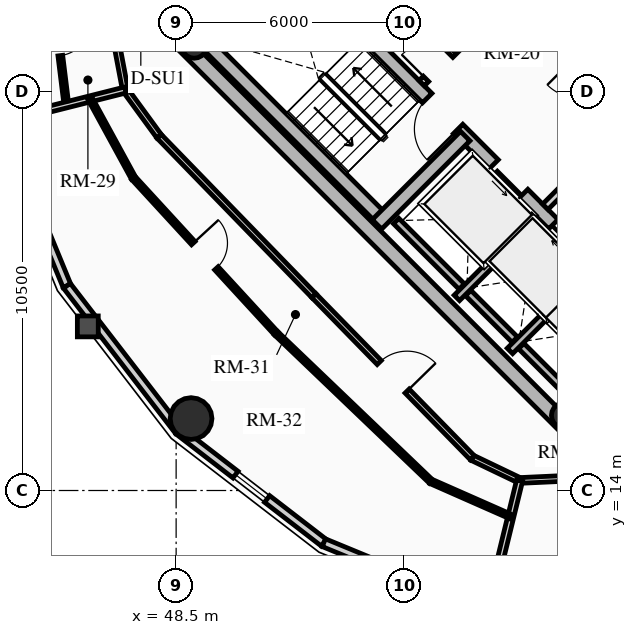
"""IFC4 building model, lengths in metres.
Left out: names, types, materials, properties, quantities, classifications, styles, units other than length and angle.
Written with IfcOpenShell. Run it as: python <this file> out.ifc"""

import sys

from ifc_helpers import new_model, si_unit, direction, frame, frame_2d, origin, origin_2d, place, context, subcontext, project, spatial, rectangle, circle, hollow_circle, extrude, source, transform, mapped, element, fill, save


model = new_model("IFC4")
c1 = context("Model", 3, precision=1e-05, world=origin(), true_north=direction((0.0, 1.0)))
c2 = subcontext(c1, "Body", "Model", "MODEL_VIEW")
j1 = project(units=[si_unit("LENGTHUNIT", "METRE"), si_unit("PLANEANGLEUNIT", "RADIAN")], contexts=[c1])
p1 = place(None, origin())
s1 = spatial("IfcSite", under=j1, at=p1, CompositionType="ELEMENT")
p2 = place(p1, origin())
s2 = spatial("IfcBuilding", under=s1, at=p2, CompositionType="ELEMENT")
p3 = place(p2, frame((0.0, 0.0, 217.03)))
s3 = spatial("IfcBuildingStorey", under=s2, at=p3, CompositionType="ELEMENT", Elevation=217.03)
for number, where, z_axis, x_axis in (
    (1, (58.702, 15.732, 0.0), (0.0, 0.0, 1.0), (-0.707, 0.707, 0.0)),
    (2, (66.268, 23.298, 0.0), (0.0, 0.0, 1.0), (-0.707, 0.707, 0.0)),
):
    element("IfcWall", number, at=place(p3, frame(where, z_axis=z_axis, x_axis=x_axis)), inside=s3, PredefinedType="SHEAR", context=c2, shape_type="SweptSolid", body=[
        extrude(rectangle(XDim=14.1, YDim=0.4, at=frame_2d((7.05, 0.0))), origin(), (0.0, 0.0, 1.0), 2.91),
    ])
p4 = place(p3, frame((58.561, 15.873, 0.0), z_axis=(0.0, 0.0, 1.0), x_axis=(0.707106781187, 0.707106781187, 0.0)))
e3 = element("IfcWall", 3, at=p4, inside=s3, PredefinedType="SHEAR", context=c2, shape_type="SweptSolid", body=[
    extrude(rectangle(XDim=10.7, YDim=0.4, at=frame_2d((5.35, 0.0))), origin(), (0.0, 0.0, 1.0), 2.91),
])
m1 = source(origin(), c2, "Body", "SweptSolid", [
    extrude(rectangle(XDim=1.5, YDim=2.02, at=frame_2d((0.75, 1.01))), frame((0.0, 0.21, 0.0), z_axis=(0.0, -1.0, 0.0), x_axis=(1.0, 0.0, 0.0)), (0.0, 0.0, 1.0), 0.42),
])
p5 = place(p4, frame((5.45, 0.0, 0.0)))
e4 = element("IfcOpeningElement", 4, at=p5, cuts=e3, PredefinedType="OPENING", context=c2, shape_type="MappedRepresentation", body=[
    mapped(m1, transform((0.0, 0.0, 0.0), x_axis=(1.0, 0.0, 0.0), y_axis=(0.0, 1.0, 0.0), z_axis=(0.0, 0.0, 1.0), scale=1.0)),
])
p6 = place(p3, frame((48.873, 25.561, 0.0), z_axis=(0.0, 0.0, 1.0), x_axis=(0.707106781187, 0.707106781187, 0.0)))
e5 = element("IfcWall", 5, at=p6, inside=s3, PredefinedType="SHEAR", context=c2, shape_type="SweptSolid", body=[
    extrude(rectangle(XDim=10.7, YDim=0.4, at=frame_2d((5.35, 0.0))), origin(), (0.0, 0.0, 1.0), 2.91),
])
p7 = place(p6, frame((4.6, 0.0, 0.0)))
e6 = element("IfcOpeningElement", 6, at=p7, cuts=e5, PredefinedType="OPENING", context=c2, shape_type="MappedRepresentation", body=[
    mapped(m1, transform((0.0, 0.0, 0.0), x_axis=(1.0, 0.0, 0.0), y_axis=(0.0, 1.0, 0.0), z_axis=(0.0, 0.0, 1.0), scale=1.0)),
])
p8 = place(p3, frame((61.06, 18.373, 0.0), z_axis=(0.0, 0.0, 1.0), x_axis=(-0.707106781187, 0.707106781187, 0.0)))
e7 = element("IfcWall", 7, at=p8, inside=s3, PredefinedType="SHEAR", context=c2, shape_type="SweptSolid", body=[
    extrude(rectangle(XDim=13.7, YDim=0.35, at=frame_2d((6.85, 0.0))), origin(), (0.0, 0.0, 1.0), 2.91),
])
m2 = source(origin(), c2, "Body", "SweptSolid", [
    extrude(rectangle(XDim=1.1, YDim=2.015, at=frame_2d((0.55, 1.007))), frame((0.0, 0.185, 0.0), z_axis=(0.0, -1.0, 0.0), x_axis=(1.0, 0.0, 0.0)), (0.0, 0.0, 1.0), 0.37),
])
p9 = place(p8, frame((4.85, 0.0, 0.0)))
e8 = element("IfcOpeningElement", 8, at=p9, cuts=e7, PredefinedType="OPENING", context=c2, shape_type="MappedRepresentation", body=[
    mapped(m2, transform((0.0, 0.0, 0.0), x_axis=(1.0, 0.0, 0.0), y_axis=(0.0, 1.0, 0.0), z_axis=(0.0, 0.0, 1.0), scale=1.0)),
])
p10 = place(p8, frame((0.625, 0.0, 0.0)))
e9 = element("IfcOpeningElement", 9, at=p10, cuts=e7, PredefinedType="OPENING", context=c2, shape_type="MappedRepresentation", body=[
    mapped(m2, transform((0.0, 0.0, 0.0), x_axis=(1.0, 0.0, 0.0), y_axis=(0.0, 1.0, 0.0), z_axis=(0.0, 0.0, 1.0), scale=1.0)),
])
p11 = place(p8, frame((2.625, 0.0, 0.0)))
e10 = element("IfcOpeningElement", 10, at=p11, cuts=e7, PredefinedType="OPENING", context=c2, shape_type="MappedRepresentation", body=[
    mapped(m2, transform((0.0, 0.0, 0.0), x_axis=(1.0, 0.0, 0.0), y_axis=(0.0, 1.0, 0.0), z_axis=(0.0, 0.0, 1.0), scale=1.0)),
])
m3 = source(origin(), c2, "Body", "SweptSolid", [
    extrude(rectangle(XDim=1.15, YDim=2.02, at=frame_2d((0.575, 1.01))), frame((0.0, 0.185, 0.0), z_axis=(0.0, -1.0, 0.0), x_axis=(1.0, 0.0, 0.0)), (0.0, 0.0, 1.0), 0.37),
])
p12 = place(p8, frame((7.27, 0.0, 0.0)))
e11 = element("IfcOpeningElement", 11, at=p12, cuts=e7, PredefinedType="OPENING", context=c2, shape_type="MappedRepresentation", body=[
    mapped(m3, transform((0.0, 0.0, 0.0), x_axis=(1.0, 0.0, 0.0), y_axis=(0.0, 1.0, 0.0), z_axis=(0.0, 0.0, 1.0), scale=1.0)),
])
p13 = place(p3, frame((63.627, 20.94, 0.0), z_axis=(0.0, 0.0, 1.0), x_axis=(-0.707119496762, 0.707094065383, 0.0)))
e12 = element("IfcWall", 12, at=p13, inside=s3, PredefinedType="SHEAR", context=c2, shape_type="SweptSolid", body=[
    extrude(rectangle(XDim=9.6, YDim=0.35, at=frame_2d((4.8, 0.0))), origin(), (0.0, 0.0, 1.0), 2.91),
])
p14 = place(p13, frame((5.28, 0.0, 0.0)))
e13 = element("IfcOpeningElement", 13, at=p14, cuts=e12, PredefinedType="OPENING", context=c2, shape_type="MappedRepresentation", body=[
    mapped(m3, transform((0.0, 0.0, 0.0), x_axis=(1.0, 0.0, 0.0), y_axis=(0.0, 1.0, 0.0), z_axis=(0.0, 0.0, 1.0), scale=1.0)),
])
p15 = place(p3, frame((53.922, 21.141, 0.0), z_axis=(0.0, 0.0, 1.0), x_axis=(-0.707106781187, 0.707106781187, 0.0)))
e14 = element("IfcWall", 14, at=p15, inside=s3, PredefinedType="SHEAR", context=c2, shape_type="SweptSolid", body=[
    extrude(rectangle(XDim=6.695, YDim=0.35, at=frame_2d((3.348, 0.0))), origin(), (0.0, 0.0, 1.0), 2.91),
])
p16 = place(p3, frame((53.784, 21.003, 0.0), z_axis=(0.0, 0.0, 1.0), x_axis=(0.707106781187, 0.707106781187, 0.0)))
e15 = element("IfcWall", 15, at=p16, inside=s3, PredefinedType="SHEAR", context=c2, shape_type="SweptSolid", body=[
    extrude(rectangle(XDim=3.285, YDim=0.35, at=frame_2d((1.643, 0.0))), origin(), (0.0, 0.0, 1.0), 2.91),
])
for number, where, z_axis, x_axis in (
    (16, (58.706, 15.976, 0.0), (0.0, 0.0, 1.0), (0.707, 0.707, 0.0)),
    (17, (48.976, 25.706, 0.0), (0.0, 0.0, 1.0), (0.707, 0.707, 0.0)),
):
    element("IfcColumn", number, at=place(p3, frame(where, z_axis=z_axis, x_axis=x_axis)), inside=s3, PredefinedType="COLUMN", context=c2, shape_type="SweptSolid", body=[
        extrude(hollow_circle(Radius=0.33, WallThickness=0.025, at=origin_2d()), origin(), (0.0, 0.0, 1.0), 2.91),
    ])
p17 = place(p3, frame((48.893, 15.893, 0.0), z_axis=(0.0, 0.0, 1.0), x_axis=(1.0, 0.0, 0.0)))
e18 = element("IfcColumn", 18, at=p17, inside=s3, PredefinedType="USERDEFINED", context=c2, shape_type="SweptSolid", body=[
    extrude(circle(Radius=0.55, at=origin_2d()), origin(), (0.0, 0.0, 1.0), 2.91),
])
p18 = place(p3, frame((45.626, 19.387, 0.0), z_axis=(0.0, 0.0, 1.0), x_axis=(-0.381309704956, 0.924447353237, 0.0)))
e19 = element("IfcWall", 19, at=p18, inside=s3, PredefinedType="SOLIDWALL", context=c2, shape_type="SweptSolid", body=[
    extrude(rectangle(XDim=4.671, YDim=0.22, at=frame_2d((2.335, 0.0))), origin(), (0.0, 0.0, 1.0), 2.322),
])
m4 = source(origin(), c2, "Body", "SweptSolid", [
    extrude(rectangle(XDim=1.05, YDim=1.3, at=frame_2d((0.525, 0.65))), frame((0.0, 0.12, 0.0), z_axis=(0.0, -1.0, 0.0), x_axis=(1.0, 0.0, 0.0)), (0.0, 0.0, 1.0), 0.24),
])
p19 = place(p18, frame((1.81, 0.0, 0.65)))
e20 = element("IfcOpeningElement", 20, at=p19, cuts=e19, PredefinedType="OPENING", context=c2, shape_type="MappedRepresentation", body=[
    mapped(m4, transform((0.0, 0.0, 0.0), x_axis=(1.0, 0.0, 0.0), y_axis=(0.0, 1.0, 0.0), z_axis=(0.0, 0.0, 1.0), scale=1.0)),
])
p20 = place(p3, frame((48.569, 15.569, 0.0), z_axis=(0.0, 0.0, 1.0), x_axis=(-0.610523083886, 0.791998462147, 0.0)))
e21 = element("IfcWall", 21, at=p20, inside=s3, PredefinedType="SOLIDWALL", context=c2, shape_type="SweptSolid", body=[
    extrude(rectangle(XDim=4.82, YDim=0.22, at=frame_2d((2.41, 0.0))), origin(), (0.0, 0.0, 1.0), 2.322),
])
p21 = place(p3, frame((52.387, 12.626, 0.0), z_axis=(0.0, 0.0, 1.0), x_axis=(-0.791998462147, 0.610523083886, 0.0)))
e22 = element("IfcWall", 22, at=p21, inside=s3, PredefinedType="SOLIDWALL", context=c2, shape_type="SweptSolid", body=[
    extrude(rectangle(XDim=4.82, YDim=0.22, at=frame_2d((2.41, 0.0))), origin(), (0.0, 0.0, 1.0), 2.322),
])
p22 = place(p21, frame((1.885, 0.0, 0.65)))
e23 = element("IfcOpeningElement", 23, at=p22, cuts=e22, PredefinedType="OPENING", context=c2, shape_type="MappedRepresentation", body=[
    mapped(m4, transform((0.0, 0.0, 0.0), x_axis=(1.0, 0.0, 0.0), y_axis=(0.0, 1.0, 0.0), z_axis=(0.0, 0.0, 1.0), scale=1.0)),
])
p23 = place(p3, frame((56.705, 10.845, 0.0), z_axis=(0.0, 0.0, 1.0), x_axis=(-0.924447353237, 0.381309704956, 0.0)))
e24 = element("IfcWall", 24, at=p23, inside=s3, PredefinedType="SOLIDWALL", context=c2, shape_type="SweptSolid", body=[
    extrude(rectangle(XDim=4.671, YDim=0.22, at=frame_2d((2.335, 0.0))), origin(), (0.0, 0.0, 1.0), 2.322),
])
p24 = place(p3, frame((55.888, 19.069, 0.0), z_axis=(0.0, 0.0, 1.0), x_axis=(0.707106781187, 0.707106781187, 0.0)))
e25 = element("IfcWall", 25, at=p24, inside=s3, PredefinedType="SHEAR", context=c2, shape_type="SweptSolid", body=[
    extrude(rectangle(XDim=2.97, YDim=0.2, at=frame_2d((1.485, 0.0))), origin(), (0.0, 0.0, 1.0), 2.91),
])
p25 = place(p3, frame((56.015, 19.366, 0.0), z_axis=(0.0, 0.0, 1.0), x_axis=(-0.707106781187, 0.707106781187, 0.0)))
e26 = element("IfcWall", 26, at=p25, inside=s3, PredefinedType="SHEAR", context=c2, shape_type="SweptSolid", body=[
    extrude(rectangle(XDim=2.44, YDim=0.2, at=frame_2d((1.22, 0.0))), origin(), (0.0, 0.0, 1.0), 2.91),
])
p26 = place(p3, frame((57.284, 17.673, 0.0), z_axis=(0.0, 0.0, 1.0), x_axis=(0.707147878904, 0.70706568108, 0.0)))
e27 = element("IfcWall", 27, at=p26, inside=s3, PredefinedType="SHEAR", context=c2, shape_type="SweptSolid", body=[
    extrude(rectangle(XDim=2.97, YDim=0.2, at=frame_2d((1.485, 0.0))), origin(), (0.0, 0.0, 1.0), 2.91),
])
p27 = place(p3, frame((57.412, 17.97, 0.0), z_axis=(0.0, 0.0, 1.0), x_axis=(-0.707106781187, 0.707106781187, 0.0)))
e28 = element("IfcWall", 28, at=p27, inside=s3, PredefinedType="SHEAR", context=c2, shape_type="SweptSolid", body=[
    extrude(rectangle(XDim=1.735, YDim=0.2, at=frame_2d((0.867, 0.0))), origin(), (0.0, 0.0, 1.0), 2.91),
])
p28 = place(p3, frame((58.737, 16.644, 0.0), z_axis=(0.0, 0.0, 1.0), x_axis=(-0.707032117043, 0.707181437447, 0.0)))
e29 = element("IfcWall", 29, at=p28, inside=s3, PredefinedType="SHEAR", context=c2, shape_type="SweptSolid", body=[
    extrude(rectangle(XDim=1.635, YDim=0.2, at=frame_2d((0.817, 0.0))), origin(), (0.0, 0.0, 1.0), 2.91),
])
p29 = place(p3, frame((58.214, 21.467, 0.0), z_axis=(0.0, 0.0, 1.0), x_axis=(0.707106781187, 0.707106781187, 0.0)))
e30 = element("IfcWall", 30, at=p29, inside=s3, PredefinedType="PARTITIONING", context=c2, shape_type="SweptSolid", body=[
    extrude(rectangle(XDim=3.28, YDim=0.2, at=frame_2d((1.64, 0.0))), origin(), (0.0, 0.0, 1.0), 2.685),
])
m5 = source(origin(), c2, "Body", "SweptSolid", [
    extrude(rectangle(XDim=1.5, YDim=2.02, at=frame_2d((0.75, 1.01))), frame((0.0, 0.11, 0.0), z_axis=(0.0, -1.0, 0.0), x_axis=(1.0, 0.0, 0.0)), (0.0, 0.0, 1.0), 0.22),
])
p30 = place(p29, frame((1.55, 0.0, 0.0)))
e31 = element("IfcOpeningElement", 31, at=p30, cuts=e30, PredefinedType="OPENING", context=c2, shape_type="MappedRepresentation", body=[
    mapped(m5, transform((0.0, 0.0, 0.0), x_axis=(1.0, 0.0, 0.0), y_axis=(0.0, 1.0, 0.0), z_axis=(0.0, 0.0, 1.0), scale=1.0)),
])
p31 = place(p3, frame((54.961, 24.719, 0.0), z_axis=(0.0, 0.0, 1.0), x_axis=(0.707106781187, 0.707106781187, 0.0)))
e32 = element("IfcWall", 32, at=p31, inside=s3, PredefinedType="PARTITIONING", context=c2, shape_type="SweptSolid", body=[
    extrude(rectangle(XDim=3.28, YDim=0.2, at=frame_2d((1.64, 0.0))), origin(), (0.0, 0.0, 1.0), 2.685),
])
m6 = source(origin(), c2, "Body", "SweptSolid", [
    extrude(rectangle(XDim=0.9, YDim=2.005, at=frame_2d((0.45, 1.002))), frame((0.0, 0.11, 0.0), z_axis=(0.0, -1.0, 0.0), x_axis=(1.0, 0.0, 0.0)), (0.0, 0.0, 1.0), 0.22),
])
p32 = place(p31, frame((0.16, 0.0, 0.0)))
e33 = element("IfcOpeningElement", 33, at=p32, cuts=e32, PredefinedType="OPENING", context=c2, shape_type="MappedRepresentation", body=[
    mapped(m6, transform((0.0, 0.0, 0.0), x_axis=(1.0, 0.0, 0.0), y_axis=(0.0, 1.0, 0.0), z_axis=(0.0, 0.0, 1.0), scale=1.0)),
])
p33 = place(p3, frame((46.912, 25.862, 0.0), z_axis=(0.0, 0.0, 1.0), x_axis=(0.186095172215, -0.98253172309, 0.0)))
e34 = element("IfcWall", 34, at=p33, inside=s3, PredefinedType="PARTITIONING", context=c2, shape_type="SweptSolid", body=[
    extrude(rectangle(XDim=1.346, YDim=0.15, at=frame_2d((0.673, 0.0))), origin(), (0.0, 0.0, 1.0), 2.322),
])
p34 = place(p3, frame((47.163, 24.54, 0.0), z_axis=(0.0, 0.0, 1.0), x_axis=(0.589711902124, -0.807613690135, 0.0)))
e35 = element("IfcWall", 35, at=p34, inside=s3, PredefinedType="PARTITIONING", context=c2, shape_type="SweptSolid", body=[
    extrude(rectangle(XDim=1.507, YDim=0.15, at=frame_2d((0.753, 0.0))), origin(), (0.0, 0.0, 1.0), 2.255),
])
p35 = place(p3, frame((48.052, 23.323, 0.0), z_axis=(0.0, 0.0, 1.0), x_axis=(0.696573981306, -0.717484974454, 0.0)))
e36 = element("IfcWall", 36, at=p35, inside=s3, PredefinedType="PARTITIONING", context=c2, shape_type="SweptSolid", body=[
    extrude(rectangle(XDim=5.849, YDim=0.15, at=frame_2d((2.925, 0.0))), origin(), (0.0, 0.0, 1.0), 2.685),
])
p36 = place(p3, frame((52.126, 19.126, 0.0), z_axis=(0.0, 0.0, 1.0), x_axis=(0.698979087027, -0.715142108884, 0.0)))
e37 = element("IfcWall", 37, at=p36, inside=s3, PredefinedType="PARTITIONING", context=c2, shape_type="SweptSolid", body=[
    extrude(rectangle(XDim=5.966, YDim=0.15, at=frame_2d((2.983, 0.0))), origin(), (0.0, 0.0, 1.0), 2.322),
])
m7 = source(origin(), c2, "Body", "SweptSolid", [
    extrude(rectangle(XDim=1.05, YDim=2.015, at=frame_2d((0.525, 1.007))), frame((0.0, 0.085, 0.0), z_axis=(0.0, -1.0, 0.0), x_axis=(1.0, 0.0, 0.0)), (0.0, 0.0, 1.0), 0.17),
])
p37 = place(p36, frame((2.458, 0.0, 0.0)))
e38 = element("IfcOpeningElement", 38, at=p37, cuts=e37, PredefinedType="OPENING", context=c2, shape_type="MappedRepresentation", body=[
    mapped(m7, transform((0.0, 0.0, 0.0), x_axis=(1.0, 0.0, 0.0), y_axis=(0.0, 1.0, 0.0), z_axis=(0.0, 0.0, 1.0), scale=1.0)),
])
p38 = place(p3, frame((56.296, 14.859, 0.0), z_axis=(0.0, 0.0, 1.0), x_axis=(0.90178292445, -0.432189260823, 0.0)))
e39 = element("IfcWall", 39, at=p38, inside=s3, PredefinedType="PARTITIONING", context=c2, shape_type="SweptSolid", body=[
    extrude(rectangle(XDim=1.377, YDim=0.15, at=frame_2d((0.688, 0.0))), origin(), (0.0, 0.0, 1.0), 2.255),
])
p39 = place(p3, frame((57.538, 14.264, 0.0), z_axis=(0.0, 0.0, 1.0), x_axis=(0.99892990172, 0.046249880546, 0.0)))
e40 = element("IfcWall", 40, at=p39, inside=s3, PredefinedType="PARTITIONING", context=c2, shape_type="SweptSolid", body=[
    extrude(rectangle(XDim=1.446, YDim=0.15, at=frame_2d((0.723, 0.0))), origin(), (0.0, 0.0, 1.0), 2.322),
])
p40 = place(p3, frame((47.163, 24.54, 0.0), z_axis=(0.0, 0.0, 1.0), x_axis=(-0.9696166611, -0.244629373781, 0.0)))
e41 = element("IfcWall", 41, at=p40, inside=s3, PredefinedType="PARTITIONING", context=c2, shape_type="SweptSolid", body=[
    extrude(rectangle(XDim=3.401, YDim=0.16, at=frame_2d((1.701, 0.0))), origin(), (0.0, 0.0, 1.0), 2.322),
])
p41 = place(p3, frame((57.538, 14.264, 0.0), z_axis=(0.0, 0.0, 1.0), x_axis=(-0.237377006249, -0.971417601706, 0.0)))
e42 = element("IfcWall", 42, at=p41, inside=s3, PredefinedType="PARTITIONING", context=c2, shape_type="SweptSolid", body=[
    extrude(rectangle(XDim=3.499, YDim=0.16, at=frame_2d((1.75, 0.0))), origin(), (0.0, 0.0, 1.0), 2.322),
])
p42 = place(p3, frame((45.328, 26.457, 0.0), z_axis=(0.0, 0.0, 1.0), x_axis=(0.122605181354, -0.992455525203, 0.0)))
e43 = element("IfcWall", 43, at=p42, inside=s3, PredefinedType="PARTITIONING", context=c2, shape_type="SweptSolid", body=[
    extrude(rectangle(XDim=2.228, YDim=0.125, at=frame_2d((1.114, 0.0))), origin(), (0.0, 0.0, 1.0), 2.322),
])
m8 = source(origin(), c2, "Body", "SweptSolid", [
    extrude(rectangle(XDim=0.9, YDim=2.005, at=frame_2d((0.45, 1.002))), frame((0.0, 0.073, 0.0), z_axis=(0.0, -1.0, 0.0), x_axis=(1.0, 0.0, 0.0)), (0.0, 0.0, 1.0), 0.145),
])
p43 = place(p42, frame((0.12, 0.0, 0.0)))
e44 = element("IfcOpeningElement", 44, at=p43, cuts=e43, PredefinedType="OPENING", context=c2, shape_type="MappedRepresentation", body=[
    mapped(m8, transform((0.0, 0.0, 0.0), x_axis=(1.0, 0.0, 0.0), y_axis=(0.0, 1.0, 0.0), z_axis=(0.0, 0.0, 1.0), scale=1.0)),
])
p44 = place(p3, frame((46.24, 24.307, 0.0), z_axis=(0.0, 0.0, 1.0), x_axis=(0.479212341296, -0.87769899849, 0.0)))
e45 = element("IfcWall", 45, at=p44, inside=s3, PredefinedType="PARTITIONING", context=c2, shape_type="SweptSolid", body=[
    extrude(rectangle(XDim=2.374, YDim=0.125, at=frame_2d((1.187, 0.0))), origin(), (0.0, 0.0, 1.0), 2.255),
])
p45 = place(p3, frame((47.377, 22.223, 0.0), z_axis=(0.0, 0.0, 1.0), x_axis=(0.676554417653, -0.736392639802, 0.0)))
e46 = element("IfcWall", 46, at=p45, inside=s3, PredefinedType="PARTITIONING", context=c2, shape_type="SweptSolid", body=[
    extrude(rectangle(XDim=5.553, YDim=0.125, at=frame_2d((2.776, 0.0))), origin(), (0.0, 0.0, 1.0), 2.685),
])
p46 = place(p45, frame((2.326, 0.0, 0.0)))
e47 = element("IfcOpeningElement", 47, at=p46, cuts=e46, PredefinedType="OPENING", context=c2, shape_type="MappedRepresentation", body=[
    mapped(m8, transform((0.0, 0.0, 0.0), x_axis=(1.0, 0.0, 0.0), y_axis=(0.0, 1.0, 0.0), z_axis=(0.0, 0.0, 1.0), scale=1.0)),
])
p47 = place(p3, frame((51.134, 18.134, 0.0), z_axis=(0.0, 0.0, 1.0), x_axis=(0.722450775654, -0.691422357721, 0.0)))
e48 = element("IfcWall", 48, at=p47, inside=s3, PredefinedType="PARTITIONING", context=c2, shape_type="SweptSolid", body=[
    extrude(rectangle(XDim=5.634, YDim=0.125, at=frame_2d((2.817, 0.0))), origin(), (0.0, 0.0, 1.0), 2.322),
])
p48 = place(p3, frame((55.204, 14.239, 0.0), z_axis=(0.0, 0.0, 1.0), x_axis=(0.914999746908, -0.403454412738, 0.0)))
e49 = element("IfcWall", 49, at=p48, inside=s3, PredefinedType="PARTITIONING", context=c2, shape_type="SweptSolid", body=[
    extrude(rectangle(XDim=2.297, YDim=0.125, at=frame_2d((1.148, 0.0))), origin(), (0.0, 0.0, 1.0), 2.255),
])
m9 = source(origin(), c2, "Body", "SweptSolid", [
    extrude(rectangle(XDim=1.05, YDim=1.3, at=frame_2d((0.525, 0.65))), frame((0.0, 0.03, 0.0), z_axis=(0.0, -1.0, 0.0), x_axis=(1.0, 0.0, 0.0)), (0.0, 0.0, 1.0), 0.06),
])
p49 = place(p22, origin())
e50 = element("IfcWindow", 50, at=p49, inside=s3, PartitioningType="SINGLE_PANEL", PredefinedType="WINDOW", context=c2, shape_type="MappedRepresentation", body=[
    mapped(m9, transform((0.0, 0.0, 0.0), x_axis=(1.0, 0.0, 0.0), y_axis=(0.0, 1.0, 0.0), z_axis=(0.0, 0.0, 1.0), scale=1.0)),
])
fill(e23, e50)
m10 = source(origin(), c2, "Body", "SweptSolid", [
    extrude(rectangle(XDim=1.1, YDim=2.015, at=frame_2d((0.55, 1.007))), frame((0.0, 0.025, 0.0), z_axis=(0.0, -1.0, 0.0), x_axis=(1.0, 0.0, 0.0)), (0.0, 0.0, 1.0), 0.05),
])
p50 = place(p9, origin())
e51 = element("IfcDoor", 51, at=p50, inside=s3, OperationType="SLIDING_TO_LEFT", PredefinedType="DOOR", context=c2, shape_type="MappedRepresentation", body=[
    mapped(m10, transform((0.0, 0.0, 0.0), x_axis=(1.0, 0.0, 0.0), y_axis=(0.0, 1.0, 0.0), z_axis=(0.0, 0.0, 1.0), scale=1.0)),
])
fill(e8, e51)
p51 = place(p11, origin())
e52 = element("IfcDoor", 52, at=p51, inside=s3, OperationType="SLIDING_TO_RIGHT", PredefinedType="DOOR", context=c2, shape_type="MappedRepresentation", body=[
    mapped(m10, transform((0.0, 0.0, 0.0), x_axis=(1.0, 0.0, 0.0), y_axis=(0.0, 1.0, 0.0), z_axis=(0.0, 0.0, 1.0), scale=1.0)),
])
fill(e10, e52)
m11 = source(origin(), c2, "Body", "SweptSolid", [
    extrude(rectangle(XDim=1.15, YDim=2.02, at=frame_2d((0.575, 1.01))), frame((0.0, 0.025, 0.0), z_axis=(0.0, -1.0, 0.0), x_axis=(1.0, 0.0, 0.0)), (0.0, 0.0, 1.0), 0.05),
])
p52 = place(p12, origin())
e53 = element("IfcDoor", 53, at=p52, inside=s3, OperationType="SINGLE_SWING_LEFT", PredefinedType="DOOR", context=c2, shape_type="MappedRepresentation", body=[
    mapped(m11, transform((0.0, 0.0, 0.0), x_axis=(1.0, 0.0, 0.0), y_axis=(0.0, 1.0, 0.0), z_axis=(0.0, 0.0, 1.0), scale=1.0)),
])
fill(e11, e53)
m12 = source(origin(), c2, "Body", "SweptSolid", [
    extrude(rectangle(XDim=0.9, YDim=2.005, at=frame_2d((0.45, 1.002))), frame((0.0, 0.025, 0.0), z_axis=(0.0, -1.0, 0.0), x_axis=(1.0, 0.0, 0.0)), (0.0, 0.0, 1.0), 0.05),
])
p53 = place(p32, origin())
e54 = element("IfcDoor", 54, at=p53, inside=s3, OperationType="SINGLE_SWING_LEFT", PredefinedType="DOOR", context=c2, shape_type="MappedRepresentation", body=[
    mapped(m12, transform((0.0, 0.0, 0.0), x_axis=(1.0, 0.0, 0.0), y_axis=(0.0, 1.0, 0.0), z_axis=(0.0, 0.0, 1.0), scale=1.0)),
])
fill(e33, e54)
p54 = place(p43, origin())
e55 = element("IfcDoor", 55, at=p54, inside=s3, OperationType="SINGLE_SWING_LEFT", PredefinedType="DOOR", context=c2, shape_type="MappedRepresentation", body=[
    mapped(m12, transform((0.0, 0.0, 0.0), x_axis=(1.0, 0.0, 0.0), y_axis=(0.0, 1.0, 0.0), z_axis=(0.0, 0.0, 1.0), scale=1.0)),
])
fill(e44, e55)
m13 = source(origin(), c2, "Body", "SweptSolid", [
    extrude(rectangle(XDim=1.05, YDim=2.015, at=frame_2d((0.525, 1.007))), frame((0.0, 0.025, 0.0), z_axis=(0.0, -1.0, 0.0), x_axis=(1.0, 0.0, 0.0)), (0.0, 0.0, 1.0), 0.05),
])
p55 = place(p37, origin())
e56 = element("IfcDoor", 56, at=p55, inside=s3, OperationType="SINGLE_SWING_RIGHT", PredefinedType="DOOR", context=c2, shape_type="MappedRepresentation", body=[
    mapped(m13, transform((0.0, 0.0, 0.0), x_axis=(1.0, 0.0, 0.0), y_axis=(0.0, 1.0, 0.0), z_axis=(0.0, 0.0, 1.0), scale=1.0)),
])
fill(e38, e56)
p56 = place(p46, origin())
e57 = element("IfcDoor", 57, at=p56, inside=s3, OperationType="SINGLE_SWING_LEFT", PredefinedType="DOOR", context=c2, shape_type="MappedRepresentation", body=[
    mapped(m12, transform((0.0, 0.0, 0.0), x_axis=(1.0, 0.0, 0.0), y_axis=(0.0, 1.0, 0.0), z_axis=(0.0, 0.0, 1.0), scale=1.0)),
])
fill(e47, e57)
save(model, sys.argv[1])
